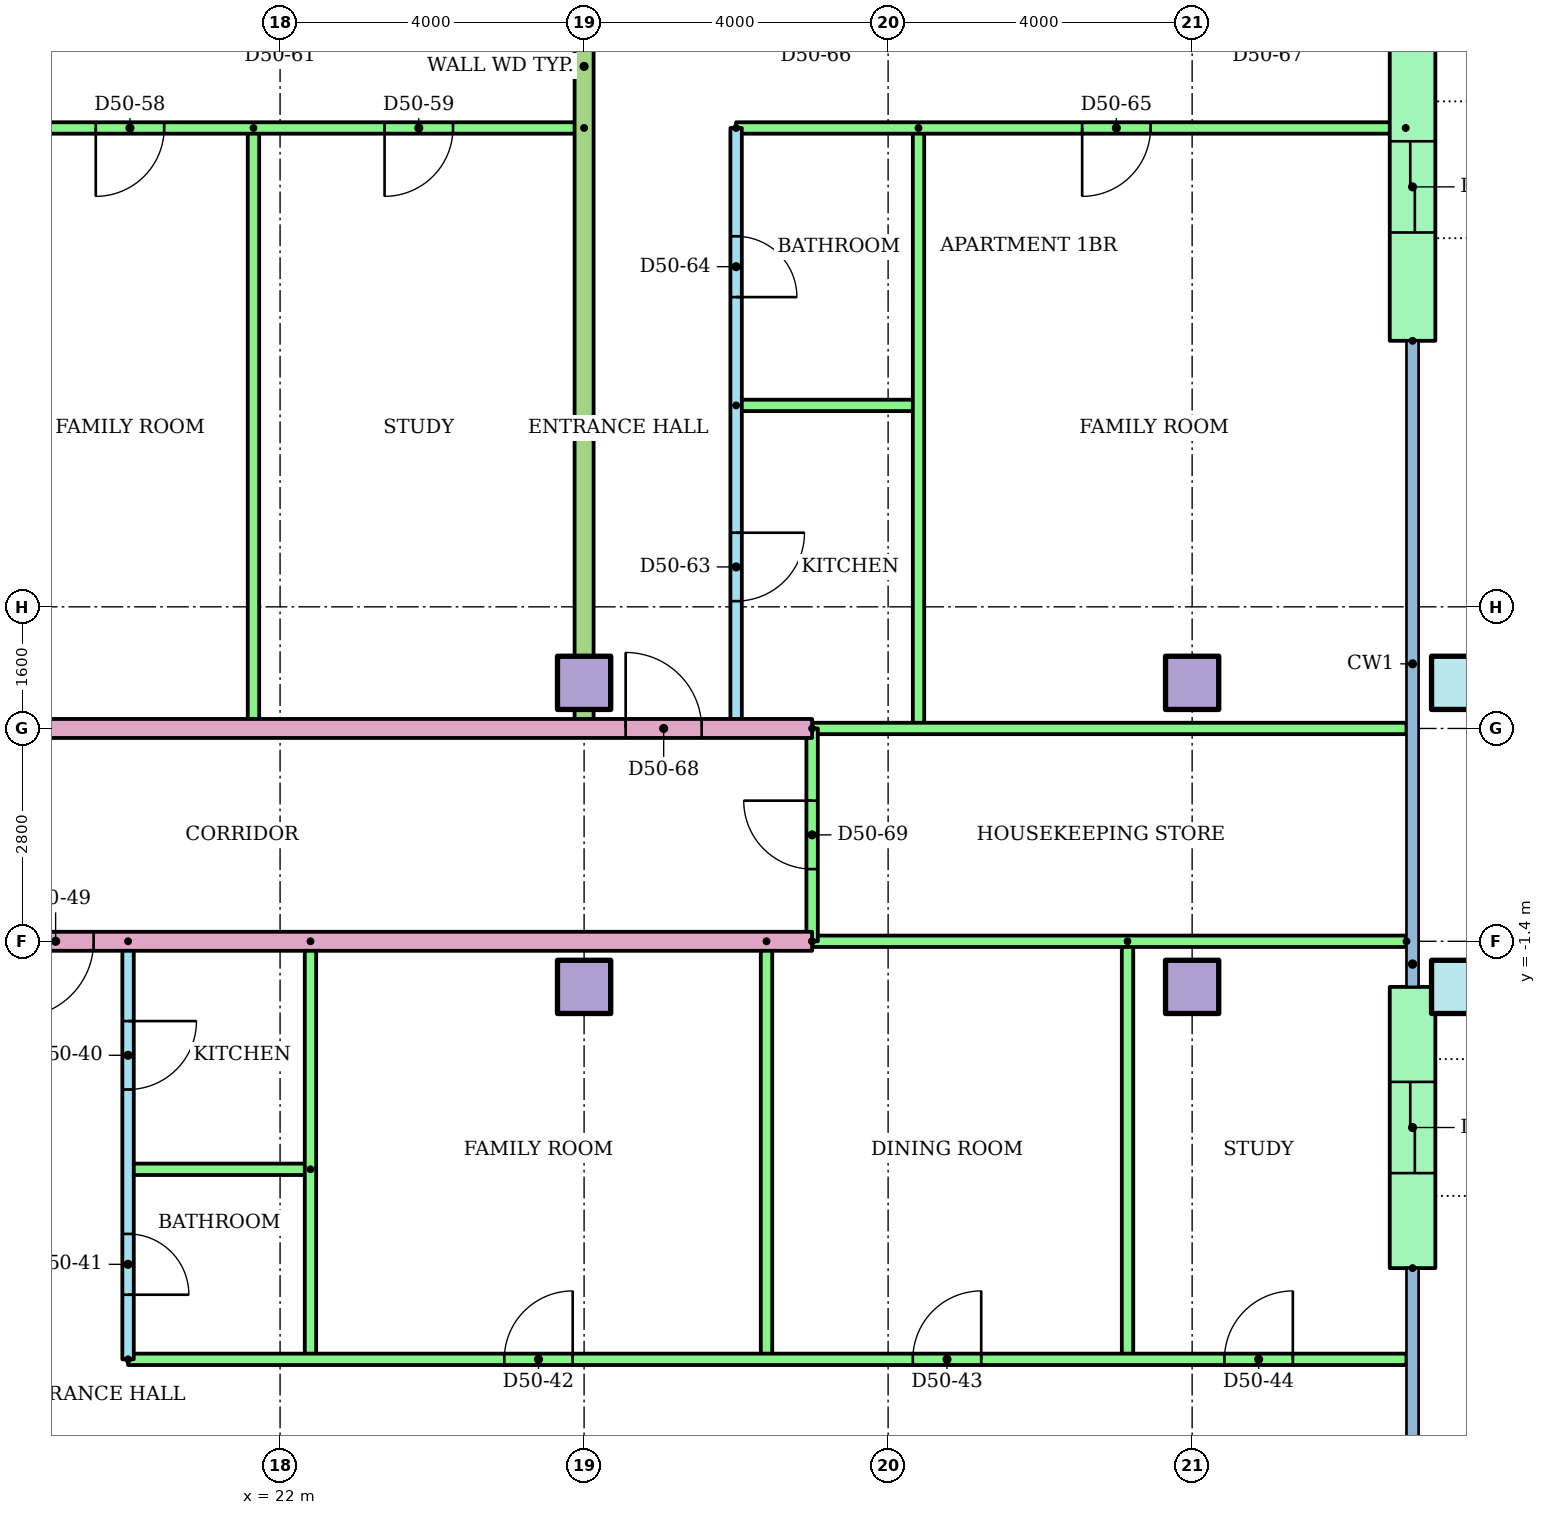
"""IFC4 building model, lengths in metres.
Left out: names, types, materials, properties, quantities, classifications, styles, units other than length and angle.
Written with IfcOpenShell. Run it as: python <this file> out.ifc"""

import sys

from ifc_helpers import new_model, si_unit, direction, frame, frame_2d, origin, origin_2d, place, context, subcontext, project, spatial, rectangle, hollow_rectangle, extrude, element, fill, save


model = new_model("IFC4")
c1 = context("Model", 3, precision=1e-05, world=origin(), true_north=direction((0.0, 1.0)))
c2 = subcontext(c1, "Body", "Model", "MODEL_VIEW")
j1 = project(units=[si_unit("LENGTHUNIT", "METRE"), si_unit("PLANEANGLEUNIT", "RADIAN")], contexts=[c1])
p1 = place(None, origin())
s1 = spatial("IfcSite", under=j1, at=p1, CompositionType="ELEMENT")
p2 = place(p1, origin())
s2 = spatial("IfcBuilding", under=s1, at=p2, CompositionType="ELEMENT")
p3 = place(p2, frame((0.0, 0.0, 190.9)))
s3 = spatial("IfcBuildingStorey", under=s2, at=p3, CompositionType="ELEMENT", Elevation=190.9)
for number, where in (
    (1, (26.0, -2.0, 0.0)),
    (2, (34.0, -2.0, 0.0)),
):
    element("IfcColumn", number, at=place(p3, frame(where)), inside=s3, PredefinedType="COLUMN", context=c2, shape_type="SweptSolid", body=[
        extrude(rectangle(XDim=0.7, YDim=0.7, at=origin_2d()), origin(), (0.0, 0.0, 1.0), 3.2),
    ])
p4 = place(p3, frame((37.5, -2.0, 0.0)))
e3 = element("IfcColumn", 3, at=p4, inside=s3, PredefinedType="COLUMN", context=c2, shape_type="SweptSolid", body=[
    extrude(hollow_rectangle(XDim=0.7, YDim=0.7, WallThickness=0.036, at=origin_2d()), origin(), (0.0, 0.0, 1.0), 3.2),
])
for number, where in (
    (4, (26.0, 2.0, 0.0)),
    (5, (34.0, 2.0, 0.0)),
):
    element("IfcColumn", number, at=place(p3, frame(where)), inside=s3, PredefinedType="COLUMN", context=c2, shape_type="SweptSolid", body=[
        extrude(rectangle(XDim=0.7, YDim=0.7, at=origin_2d()), origin(), (0.0, 0.0, 1.0), 3.2),
    ])
p5 = place(p3, frame((37.5, 2.0, 0.0)))
e6 = element("IfcColumn", 6, at=p5, inside=s3, PredefinedType="COLUMN", context=c2, shape_type="SweptSolid", body=[
    extrude(hollow_rectangle(XDim=0.7, YDim=0.7, WallThickness=0.036, at=origin_2d()), origin(), (0.0, 0.0, 1.0), 3.2),
])
p6 = place(p3, frame((36.9, -5.7, 0.0), z_axis=(0.0, 0.0, 1.0), x_axis=(0.0, 1.0, 0.0)))
e7 = element("IfcWall", 7, at=p6, inside=s3, PredefinedType="STANDARD", context=c2, shape_type="SweptSolid", body=[
    extrude(rectangle(XDim=3.7, YDim=0.6, at=frame_2d((1.85, 0.0))), origin(), (0.0, 0.0, 1.0), 2.8),
])
p7 = place(p6, frame((1.25, 0.0, 0.0)))
e8 = element("IfcOpeningElement", 8, at=p7, cuts=e7, PredefinedType="OPENING", context=c2, shape_type="SweptSolid", body=[
    extrude(rectangle(XDim=1.2, YDim=2.1, at=frame_2d((0.6, 1.05))), frame((0.0, 0.31, 0.0), z_axis=(0.0, -1.0, 0.0), x_axis=(1.0, 0.0, 0.0)), (0.0, 0.0, 1.0), 0.62),
])
p8 = place(p3, frame((36.9, 6.5, 0.0), z_axis=(0.0, 0.0, 1.0), x_axis=(0.0, 1.0, 0.0)))
e9 = element("IfcWall", 9, at=p8, inside=s3, PredefinedType="STANDARD", context=c2, shape_type="SweptSolid", body=[
    extrude(rectangle(XDim=4.5, YDim=0.6, at=frame_2d((2.25, 0.0))), origin(), (0.0, 0.0, 1.0), 2.8),
])
p9 = place(p8, frame((1.425, 0.0, 0.0)))
e10 = element("IfcOpeningElement", 10, at=p9, cuts=e9, PredefinedType="OPENING", context=c2, shape_type="SweptSolid", body=[
    extrude(rectangle(XDim=1.2, YDim=2.1, at=frame_2d((0.6, 1.05))), frame((0.0, 0.31, 0.0), z_axis=(0.0, -1.0, 0.0), x_axis=(1.0, 0.0, 0.0)), (0.0, 0.0, 1.0), 0.62),
])
p10 = place(p3, frame((20.0, -1.4, 0.0), z_axis=(0.0, 0.0, 1.0), x_axis=(0.0, -1.0, 0.0)))
e11 = element("IfcWall", 11, at=p10, inside=s3, PredefinedType="PARTITIONING", context=c2, shape_type="SweptSolid", body=[
    extrude(rectangle(XDim=5.5, YDim=0.15, at=frame_2d((2.75, 0.0))), origin(), (0.0, 0.0, 1.0), 2.4),
])
p11 = place(p10, frame((1.05, 0.0, 0.0)))
e12 = element("IfcOpeningElement", 12, at=p11, cuts=e11, PredefinedType="OPENING", context=c2, shape_type="SweptSolid", body=[
    extrude(rectangle(XDim=0.9, YDim=2.1, at=frame_2d((0.45, 1.05))), frame((0.0, 0.085, 0.0), z_axis=(0.0, -1.0, 0.0), x_axis=(1.0, 0.0, 0.0)), (0.0, 0.0, 1.0), 0.17),
])
p12 = place(p10, frame((3.85, 0.0, 0.0)))
e13 = element("IfcOpeningElement", 13, at=p12, cuts=e11, PredefinedType="OPENING", context=c2, shape_type="SweptSolid", body=[
    extrude(rectangle(XDim=0.8, YDim=2.1, at=frame_2d((0.4, 1.05))), frame((0.0, 0.085, 0.0), z_axis=(0.0, -1.0, 0.0), x_axis=(1.0, 0.0, 0.0)), (0.0, 0.0, 1.0), 0.17),
])
p13 = place(p3, frame((22.4, -4.4, 0.0), z_axis=(0.0, 0.0, 1.0), x_axis=(-1.0, 0.0, 0.0)))
e14 = element("IfcWall", 14, at=p13, inside=s3, PredefinedType="PARTITIONING", context=c2, shape_type="SweptSolid", body=[
    extrude(rectangle(XDim=2.4, YDim=0.15, at=frame_2d((1.2, 0.0))), origin(), (0.0, 0.0, 1.0), 2.4),
])
for number, where, z_axis, x_axis in (
    (15, (22.4, -1.4, 0.0), (0.0, 0.0, 1.0), (0.0, -1.0, 0.0)),
    (16, (28.4, -1.4, 0.0), (0.0, 0.0, 1.0), (0.0, -1.0, 0.0)),
    (17, (33.15, -1.4, 0.0), (0.0, 0.0, 1.0), (0.0, -1.0, 0.0)),
):
    element("IfcWall", number, at=place(p3, frame(where, z_axis=z_axis, x_axis=x_axis)), inside=s3, PredefinedType="PARTITIONING", context=c2, shape_type="SweptSolid", body=[
        extrude(rectangle(XDim=5.5, YDim=0.15, at=frame_2d((2.75, 0.0))), origin(), (0.0, 0.0, 1.0), 2.4),
    ])
p14 = place(p3, frame((20.0, -6.9, 0.0)))
e18 = element("IfcWall", 18, at=p14, inside=s3, PredefinedType="PARTITIONING", context=c2, shape_type="SweptSolid", body=[
    extrude(rectangle(XDim=16.82, YDim=0.15, at=frame_2d((8.41, 0.0))), origin(), (0.0, 0.0, 1.0), 2.4),
])
p15 = place(p14, frame((4.95, 0.0, 0.0)))
e19 = element("IfcOpeningElement", 19, at=p15, cuts=e18, PredefinedType="OPENING", context=c2, shape_type="SweptSolid", body=[
    extrude(rectangle(XDim=0.9, YDim=2.1, at=frame_2d((0.45, 1.05))), frame((0.0, 0.085, 0.0), z_axis=(0.0, -1.0, 0.0), x_axis=(1.0, 0.0, 0.0)), (0.0, 0.0, 1.0), 0.17),
])
p16 = place(p14, frame((10.325, 0.0, 0.0)))
e20 = element("IfcOpeningElement", 20, at=p16, cuts=e18, PredefinedType="OPENING", context=c2, shape_type="SweptSolid", body=[
    extrude(rectangle(XDim=0.9, YDim=2.1, at=frame_2d((0.45, 1.05))), frame((0.0, 0.085, 0.0), z_axis=(0.0, -1.0, 0.0), x_axis=(1.0, 0.0, 0.0)), (0.0, 0.0, 1.0), 0.17),
])
p17 = place(p14, frame((14.425, 0.0, 0.0)))
e21 = element("IfcOpeningElement", 21, at=p17, cuts=e18, PredefinedType="OPENING", context=c2, shape_type="SweptSolid", body=[
    extrude(rectangle(XDim=0.9, YDim=2.1, at=frame_2d((0.45, 1.05))), frame((0.0, 0.085, 0.0), z_axis=(0.0, -1.0, 0.0), x_axis=(1.0, 0.0, 0.0)), (0.0, 0.0, 1.0), 0.17),
])
p18 = place(p3, frame((29.0, -1.4, 0.0), z_axis=(0.0, 0.0, 1.0), x_axis=(-1.0, 0.0, 0.0)))
e22 = element("IfcWall", 22, at=p18, inside=s3, PredefinedType="PARTITIONING", context=c2, shape_type="SweptSolid", body=[
    extrude(rectangle(XDim=15.0, YDim=0.25, at=frame_2d((7.5, 0.0))), origin(), (0.0, 0.0, 1.0), 2.4),
])
p19 = place(p18, frame((9.453, 0.0, 0.0)))
e23 = element("IfcOpeningElement", 23, at=p19, cuts=e22, PredefinedType="OPENING", context=c2, shape_type="SweptSolid", body=[
    extrude(rectangle(XDim=1.0, YDim=2.1, at=frame_2d((0.5, 1.05))), frame((0.0, 0.135, 0.0), z_axis=(0.0, -1.0, 0.0), x_axis=(1.0, 0.0, 0.0)), (0.0, 0.0, 1.0), 0.27),
])
p20 = place(p3, frame((36.82, -1.4, 0.0), z_axis=(0.0, 0.0, 1.0), x_axis=(-1.0, 0.0, 0.0)))
e24 = element("IfcWall", 24, at=p20, inside=s3, PredefinedType="PARTITIONING", context=c2, shape_type="SweptSolid", body=[
    extrude(rectangle(XDim=7.82, YDim=0.15, at=frame_2d((3.91, 0.0))), origin(), (0.0, 0.0, 1.0), 2.4),
])
p21 = place(p3, frame((21.65, 9.3, 0.0), z_axis=(0.0, 0.0, 1.0), x_axis=(0.0, -1.0, 0.0)))
e25 = element("IfcWall", 25, at=p21, inside=s3, PredefinedType="PARTITIONING", context=c2, shape_type="SweptSolid", body=[
    extrude(rectangle(XDim=7.9, YDim=0.15, at=frame_2d((3.95, 0.0))), origin(), (0.0, 0.0, 1.0), 2.4),
])
p22 = place(p3, frame((26.0, 9.3, 0.0), z_axis=(0.0, 0.0, 1.0), x_axis=(-1.0, 0.0, 0.0)))
e26 = element("IfcWall", 26, at=p22, inside=s3, PredefinedType="PARTITIONING", context=c2, shape_type="SweptSolid", body=[
    extrude(rectangle(XDim=10.0, YDim=0.15, at=frame_2d((5.0, 0.0))), origin(), (0.0, 0.0, 1.0), 2.4),
])
p23 = place(p22, frame((5.525, 0.0, 0.0)))
e27 = element("IfcOpeningElement", 27, at=p23, cuts=e26, PredefinedType="OPENING", context=c2, shape_type="SweptSolid", body=[
    extrude(rectangle(XDim=0.9, YDim=2.1, at=frame_2d((0.45, 1.05))), frame((0.0, 0.085, 0.0), z_axis=(0.0, -1.0, 0.0), x_axis=(1.0, 0.0, 0.0)), (0.0, 0.0, 1.0), 0.17),
])
p24 = place(p22, frame((1.725, 0.0, 0.0)))
e28 = element("IfcOpeningElement", 28, at=p24, cuts=e26, PredefinedType="OPENING", context=c2, shape_type="SweptSolid", body=[
    extrude(rectangle(XDim=0.9, YDim=2.1, at=frame_2d((0.45, 1.05))), frame((0.0, 0.085, 0.0), z_axis=(0.0, -1.0, 0.0), x_axis=(1.0, 0.0, 0.0)), (0.0, 0.0, 1.0), 0.17),
])
p25 = place(p3, frame((28.0, 9.3, 0.0), z_axis=(0.0, 0.0, 1.0), x_axis=(0.0, -1.0, 0.0)))
e29 = element("IfcWall", 29, at=p25, inside=s3, PredefinedType="PARTITIONING", context=c2, shape_type="SweptSolid", body=[
    extrude(rectangle(XDim=7.9, YDim=0.15, at=frame_2d((3.95, 0.0))), origin(), (0.0, 0.0, 1.0), 2.4),
])
p26 = place(p25, frame((5.325, 0.0, 0.0)))
e30 = element("IfcOpeningElement", 30, at=p26, cuts=e29, PredefinedType="OPENING", context=c2, shape_type="SweptSolid", body=[
    extrude(rectangle(XDim=0.9, YDim=2.1, at=frame_2d((0.45, 1.05))), frame((0.0, 0.085, 0.0), z_axis=(0.0, -1.0, 0.0), x_axis=(1.0, 0.0, 0.0)), (0.0, 0.0, 1.0), 0.17),
])
p27 = place(p25, frame((1.425, 0.0, 0.0)))
e31 = element("IfcOpeningElement", 31, at=p27, cuts=e29, PredefinedType="OPENING", context=c2, shape_type="SweptSolid", body=[
    extrude(rectangle(XDim=0.8, YDim=2.1, at=frame_2d((0.4, 1.05))), frame((0.0, 0.085, 0.0), z_axis=(0.0, -1.0, 0.0), x_axis=(1.0, 0.0, 0.0)), (0.0, 0.0, 1.0), 0.17),
])
p28 = place(p3, frame((28.0, 5.65, 0.0)))
e32 = element("IfcWall", 32, at=p28, inside=s3, PredefinedType="PARTITIONING", context=c2, shape_type="SweptSolid", body=[
    extrude(rectangle(XDim=2.4, YDim=0.15, at=frame_2d((1.2, 0.0))), origin(), (0.0, 0.0, 1.0), 2.4),
])
p29 = place(p3, frame((30.4, 9.3, 0.0), z_axis=(0.0, 0.0, 1.0), x_axis=(0.0, -1.0, 0.0)))
e33 = element("IfcWall", 33, at=p29, inside=s3, PredefinedType="PARTITIONING", context=c2, shape_type="SweptSolid", body=[
    extrude(rectangle(XDim=7.9, YDim=0.15, at=frame_2d((3.95, 0.0))), origin(), (0.0, 0.0, 1.0), 2.4),
])
p30 = place(p3, frame((36.81, 9.3, 0.0), z_axis=(0.0, 0.0, 1.0), x_axis=(-1.0, 0.0, 0.0)))
e34 = element("IfcWall", 34, at=p30, inside=s3, PredefinedType="PARTITIONING", context=c2, shape_type="SweptSolid", body=[
    extrude(rectangle(XDim=8.81, YDim=0.15, at=frame_2d((4.405, 0.0))), origin(), (0.0, 0.0, 1.0), 2.4),
])
p31 = place(p30, frame((3.357, 0.0, 0.0)))
e35 = element("IfcOpeningElement", 35, at=p31, cuts=e34, PredefinedType="OPENING", context=c2, shape_type="SweptSolid", body=[
    extrude(rectangle(XDim=0.9, YDim=2.1, at=frame_2d((0.45, 1.05))), frame((0.0, 0.085, 0.0), z_axis=(0.0, -1.0, 0.0), x_axis=(1.0, 0.0, 0.0)), (0.0, 0.0, 1.0), 0.17),
])
p32 = place(p3, frame((26.0, 18.821, 0.0), z_axis=(0.0, 0.0, 1.0), x_axis=(0.0, -1.0, 0.0)))
e36 = element("IfcWall", 36, at=p32, inside=s3, PredefinedType="PARTITIONING", context=c2, shape_type="SweptSolid", body=[
    extrude(rectangle(XDim=17.421, YDim=0.25, at=frame_2d((8.71, 0.0))), origin(), (0.0, 0.0, 1.0), 2.4),
])
p33 = place(p3, frame((14.0, 1.4, 0.0)))
e37 = element("IfcWall", 37, at=p33, inside=s3, PredefinedType="PARTITIONING", context=c2, shape_type="SweptSolid", body=[
    extrude(rectangle(XDim=15.0, YDim=0.25, at=frame_2d((7.5, 0.0))), origin(), (0.0, 0.0, 1.0), 2.4),
])
p34 = place(p33, frame((0.5, 0.0, 0.0)))
e38 = element("IfcOpeningElement", 38, at=p34, cuts=e37, PredefinedType="OPENING", context=c2, shape_type="SweptSolid", body=[
    extrude(rectangle(XDim=1.0, YDim=2.1, at=frame_2d((0.5, 1.05))), frame((0.0, 0.135, 0.0), z_axis=(0.0, -1.0, 0.0), x_axis=(1.0, 0.0, 0.0)), (0.0, 0.0, 1.0), 0.27),
])
p35 = place(p33, frame((12.547, 0.0, 0.0)))
e39 = element("IfcOpeningElement", 39, at=p35, cuts=e37, PredefinedType="OPENING", context=c2, shape_type="SweptSolid", body=[
    extrude(rectangle(XDim=1.0, YDim=2.1, at=frame_2d((0.5, 1.05))), frame((0.0, 0.135, 0.0), z_axis=(0.0, -1.0, 0.0), x_axis=(1.0, 0.0, 0.0)), (0.0, 0.0, 1.0), 0.27),
])
p36 = place(p3, frame((29.0, 1.4, 0.0)))
e40 = element("IfcWall", 40, at=p36, inside=s3, PredefinedType="PARTITIONING", context=c2, shape_type="SweptSolid", body=[
    extrude(rectangle(XDim=7.82, YDim=0.15, at=frame_2d((3.91, 0.0))), origin(), (0.0, 0.0, 1.0), 2.4),
])
p37 = place(p3, frame((29.0, -1.4, 0.0), z_axis=(0.0, 0.0, 1.0), x_axis=(0.0, 1.0, 0.0)))
e41 = element("IfcWall", 41, at=p37, inside=s3, PredefinedType="PARTITIONING", context=c2, shape_type="SweptSolid", body=[
    extrude(rectangle(XDim=2.8, YDim=0.15, at=frame_2d((1.4, 0.0))), origin(), (0.0, 0.0, 1.0), 2.4),
])
p38 = place(p37, frame((0.95, 0.0, 0.0)))
e42 = element("IfcOpeningElement", 42, at=p38, cuts=e41, PredefinedType="OPENING", context=c2, shape_type="SweptSolid", body=[
    extrude(rectangle(XDim=0.9, YDim=2.1, at=frame_2d((0.45, 1.05))), frame((0.0, 0.085, 0.0), z_axis=(0.0, -1.0, 0.0), x_axis=(1.0, 0.0, 0.0)), (0.0, 0.0, 1.0), 0.17),
])
p39 = place(p11, origin())
e43 = element("IfcDoor", 43, at=p39, inside=s3, OperationType="SINGLE_SWING_LEFT", PredefinedType="DOOR", context=c2, shape_type="SweptSolid", body=[
    extrude(rectangle(XDim=0.9, YDim=2.1, at=frame_2d((0.45, 1.05))), frame((0.0, 0.025, 0.0), z_axis=(0.0, -1.0, 0.0), x_axis=(1.0, 0.0, 0.0)), (0.0, 0.0, 1.0), 0.05),
])
fill(e12, e43)
p40 = place(p12, origin())
e44 = element("IfcDoor", 44, at=p40, inside=s3, OperationType="SINGLE_SWING_RIGHT", PredefinedType="DOOR", context=c2, shape_type="SweptSolid", body=[
    extrude(rectangle(XDim=0.8, YDim=2.1, at=frame_2d((0.4, 1.05))), frame((0.0, 0.025, 0.0), z_axis=(0.0, -1.0, 0.0), x_axis=(1.0, 0.0, 0.0)), (0.0, 0.0, 1.0), 0.05),
])
fill(e13, e44)
p41 = place(p15, origin())
e45 = element("IfcDoor", 45, at=p41, inside=s3, OperationType="SINGLE_SWING_RIGHT", PredefinedType="DOOR", context=c2, shape_type="SweptSolid", body=[
    extrude(rectangle(XDim=0.9, YDim=2.1, at=frame_2d((0.45, 1.05))), frame((0.0, 0.025, 0.0), z_axis=(0.0, -1.0, 0.0), x_axis=(1.0, 0.0, 0.0)), (0.0, 0.0, 1.0), 0.05),
])
fill(e19, e45)
p42 = place(p16, origin())
e46 = element("IfcDoor", 46, at=p42, inside=s3, OperationType="SINGLE_SWING_RIGHT", PredefinedType="DOOR", context=c2, shape_type="SweptSolid", body=[
    extrude(rectangle(XDim=0.9, YDim=2.1, at=frame_2d((0.45, 1.05))), frame((0.0, 0.025, 0.0), z_axis=(0.0, -1.0, 0.0), x_axis=(1.0, 0.0, 0.0)), (0.0, 0.0, 1.0), 0.05),
])
fill(e20, e46)
p43 = place(p17, origin())
e47 = element("IfcDoor", 47, at=p43, inside=s3, OperationType="SINGLE_SWING_RIGHT", PredefinedType="DOOR", context=c2, shape_type="SweptSolid", body=[
    extrude(rectangle(XDim=0.9, YDim=2.1, at=frame_2d((0.45, 1.05))), frame((0.0, 0.025, 0.0), z_axis=(0.0, -1.0, 0.0), x_axis=(1.0, 0.0, 0.0)), (0.0, 0.0, 1.0), 0.05),
])
fill(e21, e47)
p44 = place(p19, origin())
e48 = element("IfcDoor", 48, at=p44, inside=s3, OperationType="SINGLE_SWING_RIGHT", PredefinedType="DOOR", context=c2, shape_type="SweptSolid", body=[
    extrude(rectangle(XDim=1.0, YDim=2.1, at=frame_2d((0.5, 1.05))), frame((0.0, 0.025, 0.0), z_axis=(0.0, -1.0, 0.0), x_axis=(1.0, 0.0, 0.0)), (0.0, 0.0, 1.0), 0.05),
])
fill(e23, e48)
p45 = place(p23, origin())
e49 = element("IfcDoor", 49, at=p45, inside=s3, OperationType="SINGLE_SWING_RIGHT", PredefinedType="DOOR", context=c2, shape_type="SweptSolid", body=[
    extrude(rectangle(XDim=0.9, YDim=2.1, at=frame_2d((0.45, 1.05))), frame((0.0, 0.025, 0.0), z_axis=(0.0, -1.0, 0.0), x_axis=(1.0, 0.0, 0.0)), (0.0, 0.0, 1.0), 0.05),
])
fill(e27, e49)
p46 = place(p24, origin())
e50 = element("IfcDoor", 50, at=p46, inside=s3, OperationType="SINGLE_SWING_RIGHT", PredefinedType="DOOR", context=c2, shape_type="SweptSolid", body=[
    extrude(rectangle(XDim=0.9, YDim=2.1, at=frame_2d((0.45, 1.05))), frame((0.0, 0.025, 0.0), z_axis=(0.0, -1.0, 0.0), x_axis=(1.0, 0.0, 0.0)), (0.0, 0.0, 1.0), 0.05),
])
fill(e28, e50)
p47 = place(p26, origin())
e51 = element("IfcDoor", 51, at=p47, inside=s3, OperationType="SINGLE_SWING_LEFT", PredefinedType="DOOR", context=c2, shape_type="SweptSolid", body=[
    extrude(rectangle(XDim=0.9, YDim=2.1, at=frame_2d((0.45, 1.05))), frame((0.0, 0.025, 0.0), z_axis=(0.0, -1.0, 0.0), x_axis=(1.0, 0.0, 0.0)), (0.0, 0.0, 1.0), 0.05),
])
fill(e30, e51)
p48 = place(p27, origin())
e52 = element("IfcDoor", 52, at=p48, inside=s3, OperationType="SINGLE_SWING_RIGHT", PredefinedType="DOOR", context=c2, shape_type="SweptSolid", body=[
    extrude(rectangle(XDim=0.8, YDim=2.1, at=frame_2d((0.4, 1.05))), frame((0.0, 0.025, 0.0), z_axis=(0.0, -1.0, 0.0), x_axis=(1.0, 0.0, 0.0)), (0.0, 0.0, 1.0), 0.05),
])
fill(e31, e52)
p49 = place(p31, origin())
e53 = element("IfcDoor", 53, at=p49, inside=s3, OperationType="SINGLE_SWING_RIGHT", PredefinedType="DOOR", context=c2, shape_type="SweptSolid", body=[
    extrude(rectangle(XDim=0.9, YDim=2.1, at=frame_2d((0.45, 1.05))), frame((0.0, 0.025, 0.0), z_axis=(0.0, -1.0, 0.0), x_axis=(1.0, 0.0, 0.0)), (0.0, 0.0, 1.0), 0.05),
])
fill(e35, e53)
p50 = place(p35, origin())
e54 = element("IfcDoor", 54, at=p50, inside=s3, OperationType="SINGLE_SWING_LEFT", PredefinedType="DOOR", context=c2, shape_type="SweptSolid", body=[
    extrude(rectangle(XDim=1.0, YDim=2.1, at=frame_2d((0.5, 1.05))), frame((0.0, 0.025, 0.0), z_axis=(0.0, -1.0, 0.0), x_axis=(1.0, 0.0, 0.0)), (0.0, 0.0, 1.0), 0.05),
])
fill(e39, e54)
p51 = place(p38, origin())
e55 = element("IfcDoor", 55, at=p51, inside=s3, OperationType="SINGLE_SWING_RIGHT", PredefinedType="DOOR", context=c2, shape_type="SweptSolid", body=[
    extrude(rectangle(XDim=0.9, YDim=2.1, at=frame_2d((0.45, 1.05))), frame((0.0, 0.025, 0.0), z_axis=(0.0, -1.0, 0.0), x_axis=(1.0, 0.0, 0.0)), (0.0, 0.0, 1.0), 0.05),
])
fill(e42, e55)
p52 = place(p7, origin())
e56 = element("IfcDoor", 56, at=p52, inside=s3, OperationType="SLIDING_TO_LEFT", PredefinedType="DOOR", context=c2, shape_type="SweptSolid", body=[
    extrude(rectangle(XDim=1.2, YDim=2.1, at=frame_2d((0.6, 1.05))), frame((0.0, 0.025, 0.0), z_axis=(0.0, -1.0, 0.0), x_axis=(1.0, 0.0, 0.0)), (0.0, 0.0, 1.0), 0.05),
])
fill(e8, e56)
p53 = place(p9, origin())
e57 = element("IfcDoor", 57, at=p53, inside=s3, OperationType="SLIDING_TO_LEFT", PredefinedType="DOOR", context=c2, shape_type="SweptSolid", body=[
    extrude(rectangle(XDim=1.2, YDim=2.1, at=frame_2d((0.6, 1.05))), frame((0.0, 0.025, 0.0), z_axis=(0.0, -1.0, 0.0), x_axis=(1.0, 0.0, 0.0)), (0.0, 0.0, 1.0), 0.05),
])
fill(e10, e57)
save(model, sys.argv[1])
